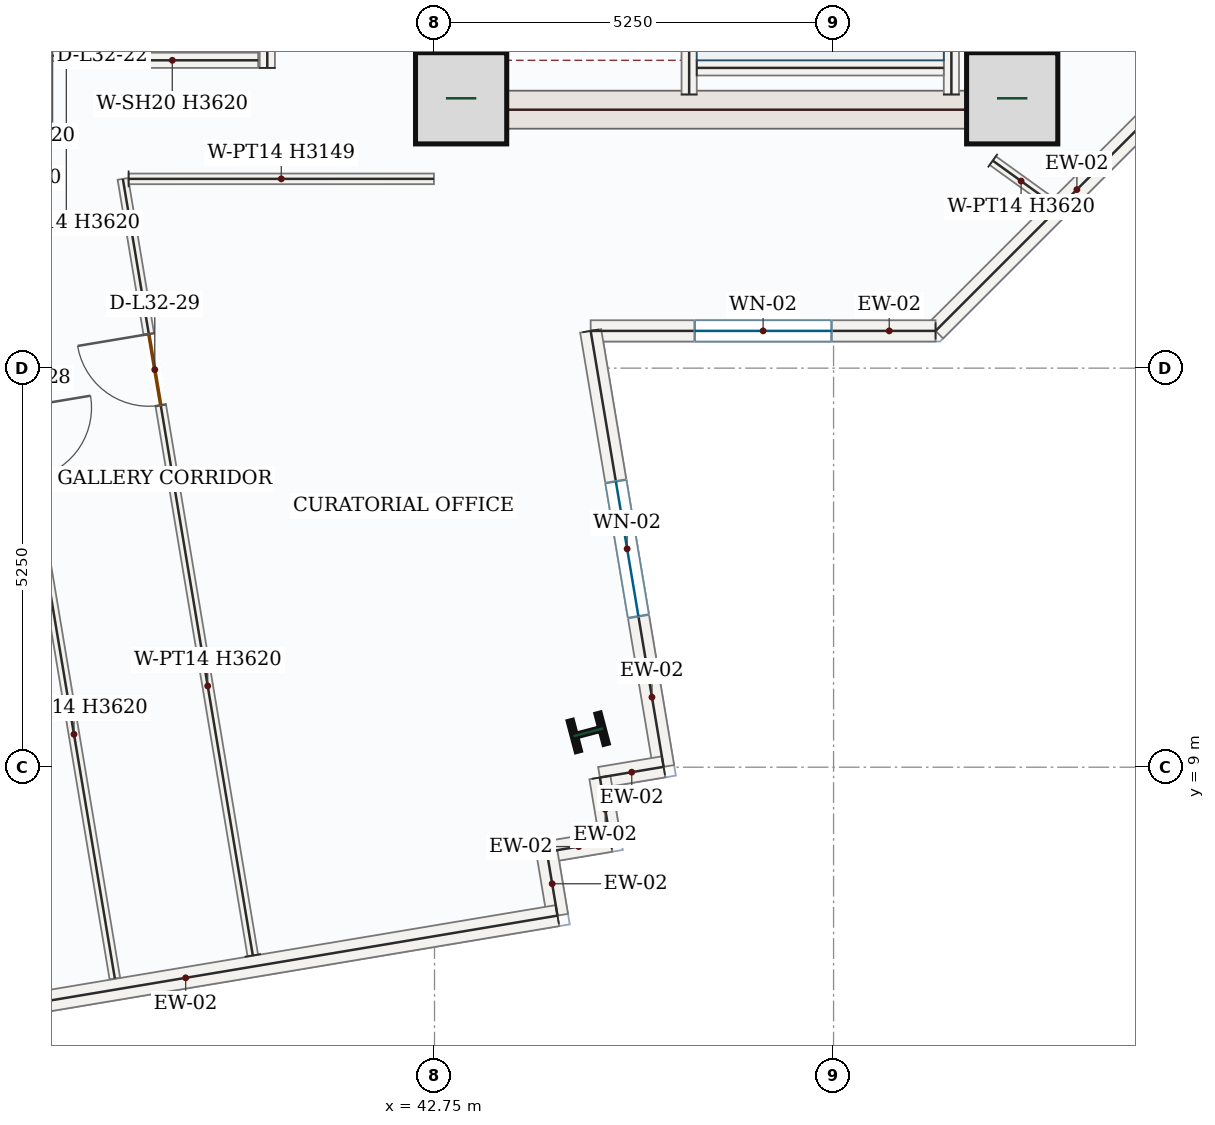
"""IFC4 building model, lengths in metres.
Left out: names, types, materials, properties, quantities, classifications, styles, units other than length and angle.
Written with IfcOpenShell. Run it as: python <this file> out.ifc"""

import sys

from ifc_helpers import new_model, si_unit, direction, frame, frame_2d, origin, origin_2d, place, context, subcontext, project, spatial, rectangle, i_section, extrude, source, transform, mapped, element, fill, save


model = new_model("IFC4")
c1 = context("Model", 3, precision=1e-05, world=origin(), true_north=direction((0.0, 1.0)))
c2 = subcontext(c1, "Body", "Model", "MODEL_VIEW")
j1 = project(units=[si_unit("LENGTHUNIT", "METRE"), si_unit("PLANEANGLEUNIT", "RADIAN")], contexts=[c1])
p1 = place(None, origin())
s1 = spatial("IfcSite", under=j1, at=p1, CompositionType="ELEMENT")
p2 = place(p1, origin())
s2 = spatial("IfcBuilding", under=s1, at=p2, CompositionType="ELEMENT")
p3 = place(p2, frame((0.0, 0.0, 143.4)))
s3 = spatial("IfcBuildingStorey", under=s2, at=p3, CompositionType="ELEMENT", Elevation=143.4)
p4 = place(p3, frame((43.0, 17.4, 0.0), z_axis=(0.0, 0.0, 1.0), x_axis=(0.0, 1.0, 0.0)))
e1 = element("IfcWall", 1, at=p4, inside=s3, PredefinedType="SHEAR", context=c2, shape_type="SweptSolid", body=[
    extrude(rectangle(XDim=8.55, YDim=0.5, at=frame_2d((4.275, 0.0))), origin(), (0.0, 0.0, 1.0), 3.62),
])
p5 = place(p4, frame((6.65, 0.0, 0.0)))
e2 = element("IfcOpeningElement", 2, at=p5, cuts=e1, PredefinedType="OPENING", context=c2, shape_type="SweptSolid", body=[
    extrude(rectangle(XDim=1.1, YDim=2.2, at=frame_2d((0.55, 1.1))), frame((0.0, 0.26, 0.0), z_axis=(0.0, -1.0, 0.0), x_axis=(1.0, 0.0, 0.0)), (0.0, 0.0, 1.0), 0.52),
])
p6 = place(p4, frame((1.75, 0.0, 0.0)))
e3 = element("IfcOpeningElement", 3, at=p6, cuts=e1, PredefinedType="OPENING", context=c2, shape_type="SweptSolid", body=[
    extrude(rectangle(XDim=1.3, YDim=2.2, at=frame_2d((0.65, 1.1))), frame((0.0, 0.26, 0.0), z_axis=(0.0, -1.0, 0.0), x_axis=(1.0, 0.0, 0.0)), (0.0, 0.0, 1.0), 0.52),
])
p7 = place(p4, frame((4.3, 0.0, 0.0)))
e4 = element("IfcOpeningElement", 4, at=p7, cuts=e1, PredefinedType="OPENING", context=c2, shape_type="SweptSolid", body=[
    extrude(rectangle(XDim=0.88, YDim=2.1, at=frame_2d((0.44, 1.05))), frame((0.0, 0.26, 0.0), z_axis=(0.0, -1.0, 0.0), x_axis=(1.0, 0.0, 0.0)), (0.0, 0.0, 1.0), 0.52),
])
m1 = source(origin(), c2, "Body", "SweptSolid", [
    extrude(rectangle(XDim=8.55, YDim=0.5, at=frame_2d((4.275, 0.0))), origin(), (0.0, 0.0, 1.0), 3.62),
])
p8 = place(p3, frame((50.5, 17.4, 0.0), z_axis=(0.0, 0.0, 1.0), x_axis=(0.0, 1.0, 0.0)))
e5 = element("IfcWall", 5, at=p8, inside=s3, PredefinedType="SHEAR", context=c2, shape_type="MappedRepresentation", body=[
    mapped(m1, transform((0.0, 0.0, 0.0), x_axis=(1.0, 0.0, 0.0), y_axis=(0.0, 1.0, 0.0), z_axis=(0.0, 0.0, 1.0), scale=1.0)),
])
m2 = source(origin(), c2, "Body", "SweptSolid", [
    extrude(rectangle(XDim=7.0, YDim=0.5, at=frame_2d((3.5, 0.0))), origin(), (0.0, 0.0, 1.0), 3.62),
])
p9 = place(p3, frame((43.25, 17.65, 0.0), z_axis=(0.0, 0.0, 1.0), x_axis=(1.0, 0.0, 0.0)))
e6 = element("IfcWall", 6, at=p9, inside=s3, PredefinedType="SHEAR", context=c2, shape_type="MappedRepresentation", body=[
    mapped(m2, transform((0.0, 0.0, 0.0), x_axis=(1.0, 0.0, 0.0), y_axis=(0.0, 1.0, 0.0), z_axis=(0.0, 0.0, 1.0), scale=1.0)),
])
m3 = source(origin(), c2, "Body", "SweptSolid", [
    extrude(rectangle(XDim=1.2, YDim=1.2, at=origin_2d()), origin(), (0.0, 0.0, 1.0), 3.9),
])
for number, where, z_axis, x_axis in (
    (7, (43.1, 17.8, 0.0), (0.0, 0.0, 1.0), (1.0, 0.0, 0.0)),
    (8, (50.35, 17.8, 0.0), (0.0, 0.0, 1.0), (1.0, 0.0, 0.0)),
):
    element("IfcColumn", number, at=place(p3, frame(where, z_axis=z_axis, x_axis=x_axis)), inside=s3, PredefinedType="COLUMN", context=c2, shape_type="MappedRepresentation", body=[
        mapped(m3, transform((0.0, 0.0, 0.0), x_axis=(1.0, 0.0, 0.0), y_axis=(0.0, 1.0, 0.0), z_axis=(0.0, 0.0, 1.0), scale=1.0)),
    ])
m4 = source(origin(), c2, "Body", "SweptSolid", [
    extrude(i_section(OverallWidth=0.412, OverallDepth=0.435, WebThickness=0.036, FlangeThickness=0.057, FilletRadius=0.018, at=origin_2d()), origin(), (0.0, 0.0, 1.0), 3.9),
])
p10 = place(p3, frame((44.772, 9.459, 0.0), z_axis=(0.0, 0.0, 1.0), x_axis=(-0.255445757936, 0.966823388604, 0.0)))
e9 = element("IfcColumn", 9, at=p10, inside=s3, PredefinedType="COLUMN", context=c2, shape_type="MappedRepresentation", body=[
    mapped(m4, transform((0.0, 0.0, 0.0), x_axis=(1.0, 0.0, 0.0), y_axis=(0.0, 1.0, 0.0), z_axis=(0.0, 0.0, 1.0), scale=1.0)),
])
m5 = source(origin(), c2, "Body", "SweptSolid", [
    extrude(rectangle(XDim=5.258, YDim=0.28, at=frame_2d((2.629, 0.0))), origin(), (0.0, 0.0, 1.0), 3.62),
])
p11 = place(p3, frame((53.06, 18.458, 0.0), z_axis=(0.0, 0.0, 1.0), x_axis=(-0.707106781187, -0.707106781187, 0.0)))
e10 = element("IfcWall", 10, at=p11, inside=s3, PredefinedType="SOLIDWALL", context=c2, shape_type="MappedRepresentation", body=[
    mapped(m5, transform((0.0, 0.0, 0.0), x_axis=(1.0, 0.0, 0.0), y_axis=(0.0, 1.0, 0.0), z_axis=(0.0, 0.0, 1.0), scale=1.0)),
])
p12 = place(p3, frame((49.342, 14.74, 0.0), z_axis=(0.0, 0.0, 1.0), x_axis=(-1.0, 0.0, 0.0)))
e11 = element("IfcWall", 11, at=p12, inside=s3, PredefinedType="SOLIDWALL", context=c2, shape_type="SweptSolid", body=[
    extrude(rectangle(XDim=4.538, YDim=0.28, at=frame_2d((2.269, 0.0))), origin(), (0.0, 0.0, 1.0), 3.62),
])
p13 = place(p12, frame((1.369, 0.0, 0.85)))
e12 = element("IfcOpeningElement", 12, at=p13, cuts=e11, PredefinedType="OPENING", context=c2, shape_type="SweptSolid", body=[
    extrude(rectangle(XDim=1.8, YDim=1.75, at=frame_2d((0.9, 0.875))), frame((0.0, 0.15, 0.0), z_axis=(0.0, -1.0, 0.0), x_axis=(1.0, 0.0, 0.0)), (0.0, 0.0, 1.0), 0.3),
])
p14 = place(p3, frame((44.804, 14.74, 0.0), z_axis=(0.0, 0.0, 1.0), x_axis=(0.165045758581, -0.986285910664, 0.0)))
e13 = element("IfcWall", 13, at=p14, inside=s3, PredefinedType="SOLIDWALL", context=c2, shape_type="SweptSolid", body=[
    extrude(rectangle(XDim=5.815, YDim=0.28, at=frame_2d((2.907, 0.0))), origin(), (0.0, 0.0, 1.0), 3.62),
])
p15 = place(p14, frame((2.007, 0.0, 0.85)))
e14 = element("IfcOpeningElement", 14, at=p15, cuts=e13, PredefinedType="OPENING", context=c2, shape_type="SweptSolid", body=[
    extrude(rectangle(XDim=1.8, YDim=1.75, at=frame_2d((0.9, 0.875))), frame((0.0, 0.15, 0.0), z_axis=(0.0, -1.0, 0.0), x_axis=(1.0, 0.0, 0.0)), (0.0, 0.0, 1.0), 0.3),
])
m6 = source(origin(), c2, "Body", "SweptSolid", [
    extrude(rectangle(XDim=0.85, YDim=0.28, at=frame_2d((0.425, 0.0))), origin(), (0.0, 0.0, 1.0), 3.62),
])
for number, where, z_axis, x_axis in (
    (15, (45.764, 9.005, 0.0), (0.0, 0.0, 1.0), (-0.986, -0.165, 0.0)),
    (16, (44.926, 8.865, 0.0), (0.0, 0.0, 1.0), (0.165, -0.986, 0.0)),
    (17, (45.066, 8.026, 0.0), (0.0, 0.0, 1.0), (-0.986, -0.165, 0.0)),
):
    element("IfcWall", number, at=place(p3, frame(where, z_axis=z_axis, x_axis=x_axis)), inside=s3, PredefinedType="SOLIDWALL", context=c2, shape_type="MappedRepresentation", body=[
        mapped(m6, transform((0.0, 0.0, 0.0), x_axis=(1.0, 0.0, 0.0), y_axis=(0.0, 1.0, 0.0), z_axis=(0.0, 0.0, 1.0), scale=1.0)),
    ])
m7 = source(origin(), c2, "Body", "SweptSolid", [
    extrude(rectangle(XDim=0.85, YDim=0.28, at=frame_2d((0.425, 0.0))), origin(), (0.0, 0.0, 1.0), 3.62),
])
p16 = place(p3, frame((44.228, 7.886, 0.0), z_axis=(0.0, 0.0, 1.0), x_axis=(0.165190918979, -0.986261608442, 0.0)))
e18 = element("IfcWall", 18, at=p16, inside=s3, PredefinedType="SOLIDWALL", context=c2, shape_type="MappedRepresentation", body=[
    mapped(m7, transform((0.0, 0.0, 0.0), x_axis=(1.0, 0.0, 0.0), y_axis=(0.0, 1.0, 0.0), z_axis=(0.0, 0.0, 1.0), scale=1.0)),
])
m8 = source(origin(), c2, "Body", "SweptSolid", [
    extrude(rectangle(XDim=9.92, YDim=0.28, at=frame_2d((4.96, 0.0))), origin(), (0.0, 0.0, 1.0), 3.62),
])
p17 = place(p3, frame((44.368, 7.048, 0.0), z_axis=(0.0, 0.0, 1.0), x_axis=(-0.986282616944, -0.165065440096, 0.0)))
e19 = element("IfcWall", 19, at=p17, inside=s3, PredefinedType="SOLIDWALL", context=c2, shape_type="MappedRepresentation", body=[
    mapped(m8, transform((0.0, 0.0, 0.0), x_axis=(1.0, 0.0, 0.0), y_axis=(0.0, 1.0, 0.0), z_axis=(0.0, 0.0, 1.0), scale=1.0)),
])
m9 = source(origin(), c2, "Body", "SweptSolid", [
    extrude(rectangle(XDim=7.87, YDim=0.2, at=frame_2d((3.935, 0.0))), origin(), (0.0, 0.0, 1.0), 3.62),
])
p18 = place(p3, frame((49.55, 17.85, 0.0), z_axis=(0.0, 0.0, 1.0), x_axis=(0.0, 1.0, 0.0)))
e20 = element("IfcWall", 20, at=p18, inside=s3, PredefinedType="SOLIDWALL", context=c2, shape_type="MappedRepresentation", body=[
    mapped(m9, transform((0.0, 0.0, 0.0), x_axis=(1.0, 0.0, 0.0), y_axis=(0.0, 1.0, 0.0), z_axis=(0.0, 0.0, 1.0), scale=1.0)),
])
p19 = place(p3, frame((46.1, 17.85, 0.0), z_axis=(0.0, 0.0, 1.0), x_axis=(0.0, 1.0, 0.0)))
e21 = element("IfcWall", 21, at=p19, inside=s3, PredefinedType="SOLIDWALL", context=c2, shape_type="SweptSolid", body=[
    extrude(rectangle(XDim=8.0, YDim=0.2, at=frame_2d((4.0, 0.0))), origin(), (0.0, 0.0, 1.0), 3.62),
])
p20 = place(p19, frame((6.3, 0.0, 0.0)))
e22 = element("IfcOpeningElement", 22, at=p20, cuts=e21, PredefinedType="OPENING", context=c2, shape_type="SweptSolid", body=[
    extrude(rectangle(XDim=1.05, YDim=2.15, at=frame_2d((0.525, 1.075))), frame((0.0, 0.11, 0.0), z_axis=(0.0, -1.0, 0.0), x_axis=(1.0, 0.0, 0.0)), (0.0, 0.0, 1.0), 0.22),
])
m10 = source(origin(), c2, "Body", "SweptSolid", [
    extrude(rectangle(XDim=3.25, YDim=0.2, at=frame_2d((1.625, 0.0))), origin(), (0.0, 0.0, 1.0), 3.62),
])
p21 = place(p3, frame((46.2, 18.2, 0.0), z_axis=(0.0, 0.0, 1.0), x_axis=(1.0, 0.0, 0.0)))
e23 = element("IfcWall", 23, at=p21, inside=s3, PredefinedType="SOLIDWALL", context=c2, shape_type="MappedRepresentation", body=[
    mapped(m10, transform((0.0, 0.0, 0.0), x_axis=(1.0, 0.0, 0.0), y_axis=(0.0, 1.0, 0.0), z_axis=(0.0, 0.0, 1.0), scale=1.0)),
])
m11 = source(origin(), c2, "Body", "SweptSolid", [
    extrude(rectangle(XDim=2.35, YDim=0.2, at=frame_2d((1.175, 0.0))), origin(), (0.0, 0.0, 1.0), 3.62),
])
p22 = place(p3, frame((38.05, 18.2, 0.0), z_axis=(0.0, 0.0, 1.0), x_axis=(0.0, 1.0, 0.0)))
e24 = element("IfcWall", 24, at=p22, inside=s3, PredefinedType="SOLIDWALL", context=c2, shape_type="MappedRepresentation", body=[
    mapped(m11, transform((0.0, 0.0, 0.0), x_axis=(1.0, 0.0, 0.0), y_axis=(0.0, 1.0, 0.0), z_axis=(0.0, 0.0, 1.0), scale=1.0)),
])
p23 = place(p3, frame((40.55, 18.2, 0.0), z_axis=(0.0, 0.0, 1.0), x_axis=(0.0, 1.0, 0.0)))
e25 = element("IfcWall", 25, at=p23, inside=s3, PredefinedType="SOLIDWALL", context=c2, shape_type="SweptSolid", body=[
    extrude(rectangle(XDim=2.35, YDim=0.2, at=frame_2d((1.175, 0.0))), origin(), (0.0, 0.0, 1.0), 3.62),
])
p24 = place(p23, frame((0.625, 0.0, 0.0)))
e26 = element("IfcOpeningElement", 26, at=p24, cuts=e25, PredefinedType="OPENING", context=c2, shape_type="SweptSolid", body=[
    extrude(rectangle(XDim=1.1, YDim=2.15, at=frame_2d((0.55, 1.075))), frame((0.0, 0.11, 0.0), z_axis=(0.0, -1.0, 0.0), x_axis=(1.0, 0.0, 0.0)), (0.0, 0.0, 1.0), 0.22),
])
m12 = source(origin(), c2, "Body", "SweptSolid", [
    extrude(rectangle(XDim=2.26, YDim=0.2, at=frame_2d((1.13, 0.0))), origin(), (0.0, 0.0, 1.0), 3.62),
])
p25 = place(p3, frame((38.17, 18.3, 0.0), z_axis=(0.0, 0.0, 1.0), x_axis=(1.0, 0.0, 0.0)))
e27 = element("IfcWall", 27, at=p25, inside=s3, PredefinedType="SOLIDWALL", context=c2, shape_type="MappedRepresentation", body=[
    mapped(m12, transform((0.0, 0.0, 0.0), x_axis=(1.0, 0.0, 0.0), y_axis=(0.0, 1.0, 0.0), z_axis=(0.0, 0.0, 1.0), scale=1.0)),
])
p26 = place(p3, frame((37.945, 18.36, 0.0), z_axis=(0.0, 0.0, 1.0), x_axis=(-1.0, 0.0, 0.0)))
e28 = element("IfcWall", 28, at=p26, inside=s3, PredefinedType="PARTITIONING", context=c2, shape_type="SweptSolid", body=[
    extrude(rectangle(XDim=1.23, YDim=0.14, at=frame_2d((0.615, 0.0))), origin(), (0.0, 0.0, 1.0), 3.62),
])
p27 = place(p26, frame((0.228, 0.0, 0.0)))
e29 = element("IfcOpeningElement", 29, at=p27, cuts=e28, PredefinedType="OPENING", context=c2, shape_type="SweptSolid", body=[
    extrude(rectangle(XDim=0.88, YDim=2.1, at=frame_2d((0.44, 1.05))), frame((0.0, 0.08, 0.0), z_axis=(0.0, -1.0, 0.0), x_axis=(1.0, 0.0, 0.0)), (0.0, 0.0, 1.0), 0.16),
])
p28 = place(p3, frame((36.978, 15.585, 0.0), z_axis=(0.0, 0.0, 1.0), x_axis=(0.165024399413, -0.986289484684, 0.0)))
e30 = element("IfcWall", 30, at=p28, inside=s3, PredefinedType="PARTITIONING", context=c2, shape_type="SweptSolid", body=[
    extrude(rectangle(XDim=9.495, YDim=0.14, at=frame_2d((4.748, 0.0))), origin(), (0.0, 0.0, 1.0), 3.62),
])
p29 = place(p28, frame((1.88, 0.0, 0.0)))
e31 = element("IfcOpeningElement", 31, at=p29, cuts=e30, PredefinedType="OPENING", context=c2, shape_type="SweptSolid", body=[
    extrude(rectangle(XDim=0.95, YDim=2.15, at=frame_2d((0.475, 1.075))), frame((0.0, 0.08, 0.0), z_axis=(0.0, -1.0, 0.0), x_axis=(1.0, 0.0, 0.0)), (0.0, 0.0, 1.0), 0.16),
])
p30 = place(p3, frame((40.359, 6.524, 0.0), z_axis=(0.0, 0.0, 1.0), x_axis=(-0.165056345303, 0.986284139016, 0.0)))
e32 = element("IfcWall", 32, at=p30, inside=s3, PredefinedType="PARTITIONING", context=c2, shape_type="SweptSolid", body=[
    extrude(rectangle(XDim=10.358, YDim=0.14, at=frame_2d((5.179, 0.0))), origin(), (0.0, 0.0, 1.0), 3.62),
])
p31 = place(p30, frame((7.338, 0.0, 0.0)))
e33 = element("IfcOpeningElement", 33, at=p31, cuts=e32, PredefinedType="OPENING", context=c2, shape_type="SweptSolid", body=[
    extrude(rectangle(XDim=0.95, YDim=2.15, at=frame_2d((0.475, 1.075))), frame((0.0, 0.08, 0.0), z_axis=(0.0, -1.0, 0.0), x_axis=(1.0, 0.0, 0.0)), (0.0, 0.0, 1.0), 0.16),
])
m13 = source(origin(), c2, "Body", "SweptSolid", [
    extrude(rectangle(XDim=4.017, YDim=0.14, at=frame_2d((2.008, 0.0))), origin(), (0.0, 0.0, 1.0), 3.149),
])
p32 = place(p3, frame((38.726, 16.74, 0.0), z_axis=(0.0, 0.0, 1.0), x_axis=(0.999999998153, 6.0779189e-05, 0.0)))
e34 = element("IfcWall", 34, at=p32, inside=s3, PredefinedType="PARTITIONING", context=c2, shape_type="MappedRepresentation", body=[
    mapped(m13, transform((0.0, 0.0, 0.0), x_axis=(1.0, 0.0, 0.0), y_axis=(0.0, 1.0, 0.0), z_axis=(0.0, 0.0, 1.0), scale=1.0)),
])
m14 = source(origin(), c2, "Body", "SweptSolid", [
    extrude(rectangle(XDim=0.919, YDim=0.14, at=frame_2d((0.459, 0.0))), origin(), (0.0, 0.0, 1.0), 3.62),
])
p33 = place(p3, frame((50.094, 16.98, 0.0), z_axis=(0.0, 0.0, 1.0), x_axis=(0.81148395648, -0.584374698611, 0.0)))
e35 = element("IfcWall", 35, at=p33, inside=s3, PredefinedType="PARTITIONING", context=c2, shape_type="MappedRepresentation", body=[
    mapped(m14, transform((0.0, 0.0, 0.0), x_axis=(1.0, 0.0, 0.0), y_axis=(0.0, 1.0, 0.0), z_axis=(0.0, 0.0, 1.0), scale=1.0)),
])
m15 = source(origin(), c2, "Body", "SweptSolid", [
    extrude(rectangle(XDim=1.8, YDim=1.75, at=frame_2d((0.9, 0.875))), frame((0.0, 0.03, 0.0), z_axis=(0.0, -1.0, 0.0), x_axis=(1.0, 0.0, 0.0)), (0.0, 0.0, 1.0), 0.06),
])
p34 = place(p13, origin())
e36 = element("IfcWindow", 36, at=p34, inside=s3, PartitioningType="DOUBLE_PANEL_VERTICAL", PredefinedType="WINDOW", context=c2, shape_type="MappedRepresentation", body=[
    mapped(m15, transform((0.0, 0.0, 0.0), x_axis=(1.0, 0.0, 0.0), y_axis=(0.0, 1.0, 0.0), z_axis=(0.0, 0.0, 1.0), scale=1.0)),
])
fill(e12, e36)
p35 = place(p15, origin())
e37 = element("IfcWindow", 37, at=p35, inside=s3, PartitioningType="DOUBLE_PANEL_VERTICAL", PredefinedType="WINDOW", context=c2, shape_type="MappedRepresentation", body=[
    mapped(m15, transform((0.0, 0.0, 0.0), x_axis=(1.0, 0.0, 0.0), y_axis=(0.0, 1.0, 0.0), z_axis=(0.0, 0.0, 1.0), scale=1.0)),
])
fill(e14, e37)
m16 = source(origin(), c2, "Body", "SweptSolid", [
    extrude(rectangle(XDim=0.95, YDim=2.15, at=frame_2d((0.475, 1.075))), frame((0.0, 0.025, 0.0), z_axis=(0.0, -1.0, 0.0), x_axis=(1.0, 0.0, 0.0)), (0.0, 0.0, 1.0), 0.05),
])
p36 = place(p31, origin())
e38 = element("IfcDoor", 38, at=p36, inside=s3, OperationType="SINGLE_SWING_RIGHT", PredefinedType="DOOR", context=c2, shape_type="MappedRepresentation", body=[
    mapped(m16, transform((0.0, 0.0, 0.0), x_axis=(1.0, 0.0, 0.0), y_axis=(0.0, 1.0, 0.0), z_axis=(0.0, 0.0, 1.0), scale=1.0)),
])
fill(e33, e38)
save(model, sys.argv[1])
